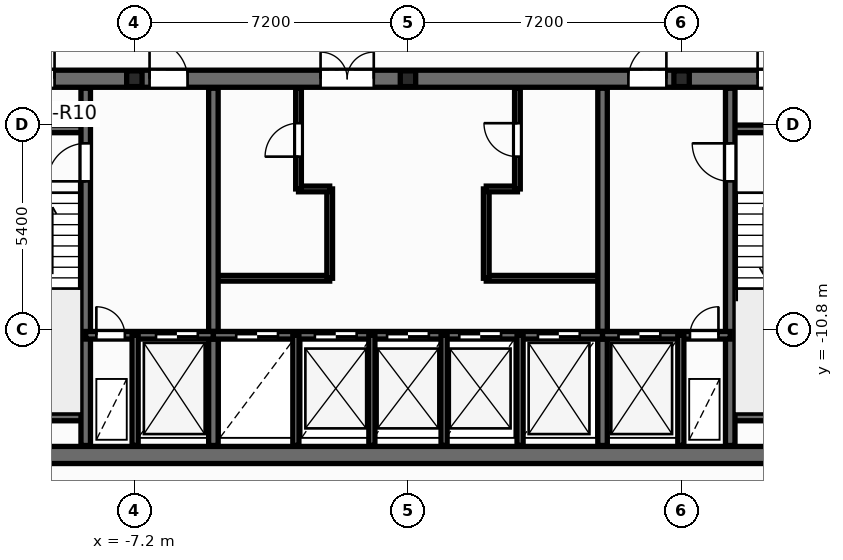
"""IFC4 building model, lengths in metres.
Left out: names, types, materials, properties, quantities, classifications, styles, units other than length and angle.
Written with IfcOpenShell. Run it as: python <this file> out.ifc"""

import sys

from ifc_helpers import new_model, si_unit, direction, frame, frame_2d, origin, origin_2d, place, context, subcontext, project, spatial, rectangle, i_section, extrude, element, fill, save


model = new_model("IFC4")
c1 = context("Model", 3, precision=1e-05, world=origin(), true_north=direction((0.0, 1.0)))
c2 = subcontext(c1, "Body", "Model", "MODEL_VIEW")
j1 = project(units=[si_unit("LENGTHUNIT", "METRE"), si_unit("PLANEANGLEUNIT", "RADIAN")], contexts=[c1])
p1 = place(None, origin())
s1 = spatial("IfcSite", under=j1, at=p1, CompositionType="ELEMENT")
p2 = place(p1, origin())
s2 = spatial("IfcBuilding", under=s1, at=p2, CompositionType="ELEMENT")
p3 = place(p2, frame((0.0, 0.0, 182.1)))
s3 = spatial("IfcBuildingStorey", under=s2, at=p3, CompositionType="ELEMENT", Elevation=182.1)
for number, where, z_axis, x_axis in (
    (1, (-7.2, -4.2, 0.0), (0.0, 0.0, 1.0), (1.0, 0.0, 0.0)),
    (2, (0.0, -4.2, 0.0), (0.0, 0.0, 1.0), (1.0, 0.0, 0.0)),
    (3, (7.2, -4.2, 0.0), (0.0, 0.0, 1.0), (1.0, 0.0, 0.0)),
):
    element("IfcColumn", number, at=place(p3, frame(where, z_axis=z_axis, x_axis=x_axis)), inside=s3, PredefinedType="PILASTER", context=c2, shape_type="SweptSolid", body=[
        extrude(i_section(OverallWidth=0.405, OverallDepth=0.414, WebThickness=0.022, FlangeThickness=0.032, at=origin_2d()), origin(), (0.0, 0.0, 1.0), 3.6),
    ])
p4 = place(p3, frame((-5.12, -9.45, 0.0), z_axis=(0.0, 0.0, 1.0), x_axis=(1.0, 0.0, 0.0)))
e4 = element("IfcWall", 4, at=p4, inside=s3, PredefinedType="PARTITIONING", context=c2, shape_type="SweptSolid", body=[
    extrude(rectangle(XDim=3.06, YDim=0.15, at=frame_2d((1.53, 0.0))), origin(), (0.0, 0.0, 1.0), 3.35),
])
p5 = place(p3, frame((-2.06, -9.45, 0.0), z_axis=(0.0, 0.0, 1.0), x_axis=(0.0, 1.0, 0.0)))
e5 = element("IfcWall", 5, at=p5, inside=s3, PredefinedType="PARTITIONING", context=c2, shape_type="SweptSolid", body=[
    extrude(rectangle(XDim=2.35, YDim=0.15, at=frame_2d((1.175, 0.0))), origin(), (0.0, 0.0, 1.0), 3.35),
])
p6 = place(p3, frame((-2.88, -7.1, 0.0), z_axis=(0.0, 0.0, 1.0), x_axis=(1.0, 0.0, 0.0)))
e6 = element("IfcWall", 6, at=p6, inside=s3, PredefinedType="PARTITIONING", context=c2, shape_type="SweptSolid", body=[
    extrude(rectangle(XDim=0.82, YDim=0.15, at=frame_2d((0.41, 0.0))), origin(), (0.0, 0.0, 1.0), 3.35),
])
p7 = place(p3, frame((-2.88, -7.1, 0.0), z_axis=(0.0, 0.0, 1.0), x_axis=(0.0, 1.0, 0.0)))
e7 = element("IfcWall", 7, at=p7, inside=s3, PredefinedType="PARTITIONING", context=c2, shape_type="SweptSolid", body=[
    extrude(rectangle(XDim=2.65, YDim=0.15, at=frame_2d((1.325, 0.0))), origin(), (0.0, 0.0, 1.0), 3.35),
])
p8 = place(p7, frame((0.85, 0.0, 0.0)))
e8 = element("IfcOpeningElement", 8, at=p8, cuts=e7, PredefinedType="OPENING", context=c2, shape_type="SweptSolid", body=[
    extrude(rectangle(XDim=0.886, YDim=2.104, at=frame_2d((0.44, 1.052))), frame((0.0, 0.085, 0.0), z_axis=(0.0, -1.0, 0.0), x_axis=(1.0, 0.0, 0.0)), (0.0, 0.0, 1.0), 0.17),
])
p9 = place(p3, frame((2.06, -9.45, 0.0), z_axis=(0.0, 0.0, 1.0), x_axis=(1.0, 0.0, 0.0)))
e9 = element("IfcWall", 9, at=p9, inside=s3, PredefinedType="PARTITIONING", context=c2, shape_type="SweptSolid", body=[
    extrude(rectangle(XDim=3.06, YDim=0.15, at=frame_2d((1.53, 0.0))), origin(), (0.0, 0.0, 1.0), 3.35),
])
p10 = place(p3, frame((2.06, -9.45, 0.0), z_axis=(0.0, 0.0, 1.0), x_axis=(0.0, 1.0, 0.0)))
e10 = element("IfcWall", 10, at=p10, inside=s3, PredefinedType="PARTITIONING", context=c2, shape_type="SweptSolid", body=[
    extrude(rectangle(XDim=2.35, YDim=0.15, at=frame_2d((1.175, 0.0))), origin(), (0.0, 0.0, 1.0), 3.35),
])
p11 = place(p3, frame((2.06, -7.1, 0.0), z_axis=(0.0, 0.0, 1.0), x_axis=(1.0, 0.0, 0.0)))
e11 = element("IfcWall", 11, at=p11, inside=s3, PredefinedType="PARTITIONING", context=c2, shape_type="SweptSolid", body=[
    extrude(rectangle(XDim=0.82, YDim=0.15, at=frame_2d((0.41, 0.0))), origin(), (0.0, 0.0, 1.0), 3.35),
])
p12 = place(p3, frame((2.88, -7.1, 0.0), z_axis=(0.0, 0.0, 1.0), x_axis=(0.0, 1.0, 0.0)))
e12 = element("IfcWall", 12, at=p12, inside=s3, PredefinedType="PARTITIONING", context=c2, shape_type="SweptSolid", body=[
    extrude(rectangle(XDim=2.65, YDim=0.15, at=frame_2d((1.325, 0.0))), origin(), (0.0, 0.0, 1.0), 3.35),
])
p13 = place(p12, frame((0.85, 0.0, 0.0)))
e13 = element("IfcOpeningElement", 13, at=p13, cuts=e12, PredefinedType="OPENING", context=c2, shape_type="SweptSolid", body=[
    extrude(rectangle(XDim=0.886, YDim=2.104, at=frame_2d((0.44, 1.052))), frame((0.0, 0.085, 0.0), z_axis=(0.0, -1.0, 0.0), x_axis=(1.0, 0.0, 0.0)), (0.0, 0.0, 1.0), 0.17),
])
p14 = place(p3, frame((-12.65, -14.1, 0.0), z_axis=(0.0, 0.0, 1.0), x_axis=(1.0, 0.0, 0.0)))
e14 = element("IfcWall", 14, at=p14, inside=s3, PredefinedType="SHEAR", context=c2, shape_type="SweptSolid", body=[
    extrude(rectangle(XDim=25.3, YDim=0.45, at=frame_2d((12.65, 0.0))), origin(), (0.0, 0.0, 1.0), 3.6),
])
p15 = place(p3, frame((-12.65, -4.2, 0.0), z_axis=(0.0, 0.0, 1.0), x_axis=(1.0, 0.0, 0.0)))
e15 = element("IfcWall", 15, at=p15, inside=s3, PredefinedType="SHEAR", context=c2, shape_type="SweptSolid", body=[
    extrude(rectangle(XDim=25.3, YDim=0.45, at=frame_2d((12.65, 0.0))), origin(), (0.0, 0.0, 1.0), 3.6),
])
p16 = place(p15, frame((0.95, 0.0, 0.0)))
e16 = element("IfcOpeningElement", 16, at=p16, cuts=e15, PredefinedType="OPENING", context=c2, shape_type="SweptSolid", body=[
    extrude(rectangle(XDim=0.756, YDim=2.054, at=frame_2d((0.375, 1.027))), frame((0.0, 0.235, 0.0), z_axis=(0.0, -1.0, 0.0), x_axis=(1.0, 0.0, 0.0)), (0.0, 0.0, 1.0), 0.47),
])
p17 = place(p15, frame((2.6, 0.0, 0.0)))
e17 = element("IfcOpeningElement", 17, at=p17, cuts=e15, PredefinedType="OPENING", context=c2, shape_type="SweptSolid", body=[
    extrude(rectangle(XDim=0.756, YDim=2.054, at=frame_2d((0.375, 1.027))), frame((0.0, 0.235, 0.0), z_axis=(0.0, -1.0, 0.0), x_axis=(1.0, 0.0, 0.0)), (0.0, 0.0, 1.0), 0.47),
])
p18 = place(p15, frame((21.85, 0.0, 0.0)))
e18 = element("IfcOpeningElement", 18, at=p18, cuts=e15, PredefinedType="OPENING", context=c2, shape_type="SweptSolid", body=[
    extrude(rectangle(XDim=0.756, YDim=2.054, at=frame_2d((0.375, 1.027))), frame((0.0, 0.235, 0.0), z_axis=(0.0, -1.0, 0.0), x_axis=(1.0, 0.0, 0.0)), (0.0, 0.0, 1.0), 0.47),
])
p19 = place(p15, frame((23.5, 0.0, 0.0)))
e19 = element("IfcOpeningElement", 19, at=p19, cuts=e15, PredefinedType="OPENING", context=c2, shape_type="SweptSolid", body=[
    extrude(rectangle(XDim=0.756, YDim=2.054, at=frame_2d((0.375, 1.027))), frame((0.0, 0.235, 0.0), z_axis=(0.0, -1.0, 0.0), x_axis=(1.0, 0.0, 0.0)), (0.0, 0.0, 1.0), 0.47),
])
p20 = place(p15, frame((5.85, 0.0, 0.0)))
e20 = element("IfcOpeningElement", 20, at=p20, cuts=e15, PredefinedType="OPENING", context=c2, shape_type="SweptSolid", body=[
    extrude(rectangle(XDim=1.006, YDim=2.104, at=frame_2d((0.5, 1.052))), frame((0.0, 0.235, 0.0), z_axis=(0.0, -1.0, 0.0), x_axis=(1.0, 0.0, 0.0)), (0.0, 0.0, 1.0), 0.47),
])
p21 = place(p15, frame((10.35, 0.0, 0.0)))
e21 = element("IfcOpeningElement", 21, at=p21, cuts=e15, PredefinedType="OPENING", context=c2, shape_type="SweptSolid", body=[
    extrude(rectangle(XDim=1.406, YDim=2.154, at=frame_2d((0.7, 1.077))), frame((0.0, 0.235, 0.0), z_axis=(0.0, -1.0, 0.0), x_axis=(1.0, 0.0, 0.0)), (0.0, 0.0, 1.0), 0.47),
])
p22 = place(p15, frame((18.45, 0.0, 0.0)))
e22 = element("IfcOpeningElement", 22, at=p22, cuts=e15, PredefinedType="OPENING", context=c2, shape_type="SweptSolid", body=[
    extrude(rectangle(XDim=1.006, YDim=2.104, at=frame_2d((0.5, 1.052))), frame((0.0, 0.235, 0.0), z_axis=(0.0, -1.0, 0.0), x_axis=(1.0, 0.0, 0.0)), (0.0, 0.0, 1.0), 0.47),
])
for number, where, z_axis, x_axis in (
    (23, (-12.35, -5.52, 0.0), (0.0, 0.0, 1.0), (1.0, 0.0, 0.0)),
    (24, (-12.35, -13.1, 0.0), (0.0, 0.0, 1.0), (1.0, 0.0, 0.0)),
    (25, (8.48, -5.52, 0.0), (0.0, 0.0, 1.0), (1.0, 0.0, 0.0)),
    (26, (8.48, -13.1, 0.0), (0.0, 0.0, 1.0), (1.0, 0.0, 0.0)),
):
    element("IfcWall", number, at=place(p3, frame(where, z_axis=z_axis, x_axis=x_axis)), inside=s3, PredefinedType="SOLIDWALL", context=c2, shape_type="SweptSolid", body=[
        extrude(rectangle(XDim=3.87, YDim=0.2, at=frame_2d((1.935, 0.0))), origin(), (0.0, 0.0, 1.0), 3.6),
    ])
p23 = place(p3, frame((-8.48, -13.85, 0.0), z_axis=(0.0, 0.0, 1.0), x_axis=(0.0, 1.0, 0.0)))
e27 = element("IfcWall", 27, at=p23, inside=s3, PredefinedType="SHEAR", context=c2, shape_type="SweptSolid", body=[
    extrude(rectangle(XDim=9.4, YDim=0.25, at=frame_2d((4.7, 0.0))), origin(), (0.0, 0.0, 1.0), 3.6),
])
p24 = place(p23, frame((6.95, 0.0, 0.0)))
e28 = element("IfcOpeningElement", 28, at=p24, cuts=e27, PredefinedType="OPENING", context=c2, shape_type="SweptSolid", body=[
    extrude(rectangle(XDim=1.006, YDim=2.104, at=frame_2d((0.5, 1.052))), frame((0.0, 0.135, 0.0), z_axis=(0.0, -1.0, 0.0), x_axis=(1.0, 0.0, 0.0)), (0.0, 0.0, 1.0), 0.27),
])
p25 = place(p3, frame((8.48, -13.85, 0.0), z_axis=(0.0, 0.0, 1.0), x_axis=(0.0, 1.0, 0.0)))
e29 = element("IfcWall", 29, at=p25, inside=s3, PredefinedType="SHEAR", context=c2, shape_type="SweptSolid", body=[
    extrude(rectangle(XDim=9.4, YDim=0.25, at=frame_2d((4.7, 0.0))), origin(), (0.0, 0.0, 1.0), 3.6),
])
p26 = place(p25, frame((6.95, 0.0, 0.0)))
e30 = element("IfcOpeningElement", 30, at=p26, cuts=e29, PredefinedType="OPENING", context=c2, shape_type="SweptSolid", body=[
    extrude(rectangle(XDim=1.006, YDim=2.104, at=frame_2d((0.5, 1.052))), frame((0.0, 0.135, 0.0), z_axis=(0.0, -1.0, 0.0), x_axis=(1.0, 0.0, 0.0)), (0.0, 0.0, 1.0), 0.27),
])
for number, where, z_axis, x_axis in (
    (31, (-5.12, -13.85, 0.0), (0.0, 0.0, 1.0), (0.0, 1.0, 0.0)),
    (32, (5.12, -13.85, 0.0), (0.0, 0.0, 1.0), (0.0, 1.0, 0.0)),
):
    element("IfcWall", number, at=place(p3, frame(where, z_axis=z_axis, x_axis=x_axis)), inside=s3, PredefinedType="SHEAR", context=c2, shape_type="SweptSolid", body=[
        extrude(rectangle(XDim=9.4, YDim=0.25, at=frame_2d((4.7, 0.0))), origin(), (0.0, 0.0, 1.0), 3.6),
    ])
p27 = place(p3, frame((-8.48, -10.95, 0.0), z_axis=(0.0, 0.0, 1.0), x_axis=(1.0, 0.0, 0.0)))
e33 = element("IfcWall", 33, at=p27, inside=s3, PredefinedType="SOLIDWALL", context=c2, shape_type="SweptSolid", body=[
    extrude(rectangle(XDim=3.36, YDim=0.2, at=frame_2d((1.68, 0.0))), origin(), (0.0, 0.0, 1.0), 3.6),
])
p28 = place(p27, frame((0.28, 0.0, 0.0)))
e34 = element("IfcOpeningElement", 34, at=p28, cuts=e33, PredefinedType="OPENING", context=c2, shape_type="SweptSolid", body=[
    extrude(rectangle(XDim=0.756, YDim=2.054, at=frame_2d((0.375, 1.027))), frame((0.0, 0.11, 0.0), z_axis=(0.0, -1.0, 0.0), x_axis=(1.0, 0.0, 0.0)), (0.0, 0.0, 1.0), 0.22),
])
p29 = place(p27, frame((1.85, 0.0, 0.0)))
e35 = element("IfcOpeningElement", 35, at=p29, cuts=e33, PredefinedType="OPENING", context=c2, shape_type="SweptSolid", body=[
    extrude(rectangle(XDim=1.106, YDim=2.104, at=frame_2d((0.55, 1.052))), frame((0.0, 0.11, 0.0), z_axis=(0.0, -1.0, 0.0), x_axis=(1.0, 0.0, 0.0)), (0.0, 0.0, 1.0), 0.22),
])
p30 = place(p3, frame((-5.12, -10.95, 0.0), z_axis=(0.0, 0.0, 1.0), x_axis=(1.0, 0.0, 0.0)))
e36 = element("IfcWall", 36, at=p30, inside=s3, PredefinedType="SOLIDWALL", context=c2, shape_type="SweptSolid", body=[
    extrude(rectangle(XDim=10.24, YDim=0.2, at=frame_2d((5.12, 0.0))), origin(), (0.0, 0.0, 1.0), 3.6),
])
p31 = place(p30, frame((0.6, 0.0, 0.0)))
e37 = element("IfcOpeningElement", 37, at=p31, cuts=e36, PredefinedType="OPENING", context=c2, shape_type="SweptSolid", body=[
    extrude(rectangle(XDim=1.106, YDim=2.104, at=frame_2d((0.55, 1.052))), frame((0.0, 0.11, 0.0), z_axis=(0.0, -1.0, 0.0), x_axis=(1.0, 0.0, 0.0)), (0.0, 0.0, 1.0), 0.22),
])
p32 = place(p30, frame((2.67, 0.0, 0.0)))
e38 = element("IfcOpeningElement", 38, at=p32, cuts=e36, PredefinedType="OPENING", context=c2, shape_type="SweptSolid", body=[
    extrude(rectangle(XDim=1.106, YDim=2.104, at=frame_2d((0.55, 1.052))), frame((0.0, 0.11, 0.0), z_axis=(0.0, -1.0, 0.0), x_axis=(1.0, 0.0, 0.0)), (0.0, 0.0, 1.0), 0.22),
])
p33 = place(p30, frame((4.57, 0.0, 0.0)))
e39 = element("IfcOpeningElement", 39, at=p33, cuts=e36, PredefinedType="OPENING", context=c2, shape_type="SweptSolid", body=[
    extrude(rectangle(XDim=1.106, YDim=2.104, at=frame_2d((0.55, 1.052))), frame((0.0, 0.11, 0.0), z_axis=(0.0, -1.0, 0.0), x_axis=(1.0, 0.0, 0.0)), (0.0, 0.0, 1.0), 0.22),
])
p34 = place(p30, frame((6.47, 0.0, 0.0)))
e40 = element("IfcOpeningElement", 40, at=p34, cuts=e36, PredefinedType="OPENING", context=c2, shape_type="SweptSolid", body=[
    extrude(rectangle(XDim=1.106, YDim=2.104, at=frame_2d((0.55, 1.052))), frame((0.0, 0.11, 0.0), z_axis=(0.0, -1.0, 0.0), x_axis=(1.0, 0.0, 0.0)), (0.0, 0.0, 1.0), 0.22),
])
p35 = place(p30, frame((8.54, 0.0, 0.0)))
e41 = element("IfcOpeningElement", 41, at=p35, cuts=e36, PredefinedType="OPENING", context=c2, shape_type="SweptSolid", body=[
    extrude(rectangle(XDim=1.106, YDim=2.104, at=frame_2d((0.55, 1.052))), frame((0.0, 0.11, 0.0), z_axis=(0.0, -1.0, 0.0), x_axis=(1.0, 0.0, 0.0)), (0.0, 0.0, 1.0), 0.22),
])
p36 = place(p3, frame((5.12, -10.95, 0.0), z_axis=(0.0, 0.0, 1.0), x_axis=(1.0, 0.0, 0.0)))
e42 = element("IfcWall", 42, at=p36, inside=s3, PredefinedType="SOLIDWALL", context=c2, shape_type="SweptSolid", body=[
    extrude(rectangle(XDim=3.36, YDim=0.2, at=frame_2d((1.68, 0.0))), origin(), (0.0, 0.0, 1.0), 3.6),
])
p37 = place(p36, frame((0.42, 0.0, 0.0)))
e43 = element("IfcOpeningElement", 43, at=p37, cuts=e42, PredefinedType="OPENING", context=c2, shape_type="SweptSolid", body=[
    extrude(rectangle(XDim=1.106, YDim=2.104, at=frame_2d((0.55, 1.052))), frame((0.0, 0.11, 0.0), z_axis=(0.0, -1.0, 0.0), x_axis=(1.0, 0.0, 0.0)), (0.0, 0.0, 1.0), 0.22),
])
p38 = place(p36, frame((2.3, 0.0, 0.0)))
e44 = element("IfcOpeningElement", 44, at=p38, cuts=e42, PredefinedType="OPENING", context=c2, shape_type="SweptSolid", body=[
    extrude(rectangle(XDim=0.756, YDim=2.054, at=frame_2d((0.375, 1.027))), frame((0.0, 0.11, 0.0), z_axis=(0.0, -1.0, 0.0), x_axis=(1.0, 0.0, 0.0)), (0.0, 0.0, 1.0), 0.22),
])
for number, where, z_axis, x_axis in (
    (45, (-7.18, -13.85, 0.0), (0.0, 0.0, 1.0), (0.0, 1.0, 0.0)),
    (46, (7.18, -13.85, 0.0), (0.0, 0.0, 1.0), (0.0, 1.0, 0.0)),
    (47, (-2.95, -13.85, 0.0), (0.0, 0.0, 1.0), (0.0, 1.0, 0.0)),
    (48, (2.95, -13.85, 0.0), (0.0, 0.0, 1.0), (0.0, 1.0, 0.0)),
    (49, (-0.95, -13.85, 0.0), (0.0, 0.0, 1.0), (0.0, 1.0, 0.0)),
    (50, (0.95, -13.85, 0.0), (0.0, 0.0, 1.0), (0.0, 1.0, 0.0)),
):
    element("IfcWall", number, at=place(p3, frame(where, z_axis=z_axis, x_axis=x_axis)), inside=s3, PredefinedType="PARTITIONING", context=c2, shape_type="SweptSolid", body=[
        extrude(rectangle(XDim=2.9, YDim=0.16, at=frame_2d((1.45, 0.0))), origin(), (0.0, 0.0, 1.0), 2.475),
    ])
p39 = place(p8, origin())
e51 = element("IfcDoor", 51, at=p39, inside=s3, OperationType="SINGLE_SWING_LEFT", PredefinedType="DOOR", context=c2, shape_type="SweptSolid", body=[
    extrude(rectangle(XDim=0.88, YDim=2.1, at=frame_2d((0.44, 1.05))), frame((0.0, 0.025, 0.0), z_axis=(0.0, -1.0, 0.0), x_axis=(1.0, 0.0, 0.0)), (0.0, 0.0, 1.0), 0.05),
])
fill(e8, e51)
p40 = place(p13, origin())
e52 = element("IfcDoor", 52, at=p40, inside=s3, OperationType="SINGLE_SWING_RIGHT", PredefinedType="DOOR", context=c2, shape_type="SweptSolid", body=[
    extrude(rectangle(XDim=0.88, YDim=2.1, at=frame_2d((0.44, 1.05))), frame((0.0, 0.025, 0.0), z_axis=(0.0, -1.0, 0.0), x_axis=(1.0, 0.0, 0.0)), (0.0, 0.0, 1.0), 0.05),
])
fill(e13, e52)
p41 = place(p24, origin())
e53 = element("IfcDoor", 53, at=p41, inside=s3, OperationType="SINGLE_SWING_LEFT", PredefinedType="DOOR", context=c2, shape_type="SweptSolid", body=[
    extrude(rectangle(XDim=1.0, YDim=2.1, at=frame_2d((0.5, 1.05))), frame((0.0, 0.025, 0.0), z_axis=(0.0, -1.0, 0.0), x_axis=(1.0, 0.0, 0.0)), (0.0, 0.0, 1.0), 0.05),
])
fill(e28, e53)
p42 = place(p26, origin())
e54 = element("IfcDoor", 54, at=p42, inside=s3, OperationType="SINGLE_SWING_RIGHT", PredefinedType="DOOR", context=c2, shape_type="SweptSolid", body=[
    extrude(rectangle(XDim=1.0, YDim=2.1, at=frame_2d((0.5, 1.05))), frame((0.0, 0.025, 0.0), z_axis=(0.0, -1.0, 0.0), x_axis=(1.0, 0.0, 0.0)), (0.0, 0.0, 1.0), 0.05),
])
fill(e30, e54)
p43 = place(p28, origin())
e55 = element("IfcDoor", 55, at=p43, inside=s3, OperationType="SINGLE_SWING_LEFT", PredefinedType="DOOR", context=c2, shape_type="SweptSolid", body=[
    extrude(rectangle(XDim=0.75, YDim=2.05, at=frame_2d((0.375, 1.025))), frame((0.0, 0.025, 0.0), z_axis=(0.0, -1.0, 0.0), x_axis=(1.0, 0.0, 0.0)), (0.0, 0.0, 1.0), 0.05),
])
fill(e34, e55)
p44 = place(p29, origin())
e56 = element("IfcDoor", 56, at=p44, inside=s3, OperationType="DOUBLE_DOOR_SLIDING", PredefinedType="DOOR", context=c2, shape_type="SweptSolid", body=[
    extrude(rectangle(XDim=1.1, YDim=2.1, at=frame_2d((0.55, 1.05))), frame((0.0, 0.025, 0.0), z_axis=(0.0, -1.0, 0.0), x_axis=(1.0, 0.0, 0.0)), (0.0, 0.0, 1.0), 0.05),
])
fill(e35, e56)
p45 = place(p37, origin())
e57 = element("IfcDoor", 57, at=p45, inside=s3, OperationType="DOUBLE_DOOR_SLIDING", PredefinedType="DOOR", context=c2, shape_type="SweptSolid", body=[
    extrude(rectangle(XDim=1.1, YDim=2.1, at=frame_2d((0.55, 1.05))), frame((0.0, 0.025, 0.0), z_axis=(0.0, -1.0, 0.0), x_axis=(1.0, 0.0, 0.0)), (0.0, 0.0, 1.0), 0.05),
])
fill(e43, e57)
p46 = place(p38, origin())
e58 = element("IfcDoor", 58, at=p46, inside=s3, OperationType="SINGLE_SWING_RIGHT", PredefinedType="DOOR", context=c2, shape_type="SweptSolid", body=[
    extrude(rectangle(XDim=0.75, YDim=2.05, at=frame_2d((0.375, 1.025))), frame((0.0, 0.025, 0.0), z_axis=(0.0, -1.0, 0.0), x_axis=(1.0, 0.0, 0.0)), (0.0, 0.0, 1.0), 0.05),
])
fill(e44, e58)
p47 = place(p31, origin())
e59 = element("IfcDoor", 59, at=p47, inside=s3, OperationType="DOUBLE_DOOR_SLIDING", PredefinedType="DOOR", context=c2, shape_type="SweptSolid", body=[
    extrude(rectangle(XDim=1.1, YDim=2.1, at=frame_2d((0.55, 1.05))), frame((0.0, 0.025, 0.0), z_axis=(0.0, -1.0, 0.0), x_axis=(1.0, 0.0, 0.0)), (0.0, 0.0, 1.0), 0.05),
])
fill(e37, e59)
p48 = place(p32, origin())
e60 = element("IfcDoor", 60, at=p48, inside=s3, OperationType="DOUBLE_DOOR_SLIDING", PredefinedType="DOOR", context=c2, shape_type="SweptSolid", body=[
    extrude(rectangle(XDim=1.1, YDim=2.1, at=frame_2d((0.55, 1.05))), frame((0.0, 0.025, 0.0), z_axis=(0.0, -1.0, 0.0), x_axis=(1.0, 0.0, 0.0)), (0.0, 0.0, 1.0), 0.05),
])
fill(e38, e60)
p49 = place(p33, origin())
e61 = element("IfcDoor", 61, at=p49, inside=s3, OperationType="DOUBLE_DOOR_SLIDING", PredefinedType="DOOR", context=c2, shape_type="SweptSolid", body=[
    extrude(rectangle(XDim=1.1, YDim=2.1, at=frame_2d((0.55, 1.05))), frame((0.0, 0.025, 0.0), z_axis=(0.0, -1.0, 0.0), x_axis=(1.0, 0.0, 0.0)), (0.0, 0.0, 1.0), 0.05),
])
fill(e39, e61)
p50 = place(p34, origin())
e62 = element("IfcDoor", 62, at=p50, inside=s3, OperationType="DOUBLE_DOOR_SLIDING", PredefinedType="DOOR", context=c2, shape_type="SweptSolid", body=[
    extrude(rectangle(XDim=1.1, YDim=2.1, at=frame_2d((0.55, 1.05))), frame((0.0, 0.025, 0.0), z_axis=(0.0, -1.0, 0.0), x_axis=(1.0, 0.0, 0.0)), (0.0, 0.0, 1.0), 0.05),
])
fill(e40, e62)
p51 = place(p35, origin())
e63 = element("IfcDoor", 63, at=p51, inside=s3, OperationType="DOUBLE_DOOR_SLIDING", PredefinedType="DOOR", context=c2, shape_type="SweptSolid", body=[
    extrude(rectangle(XDim=1.1, YDim=2.1, at=frame_2d((0.55, 1.05))), frame((0.0, 0.025, 0.0), z_axis=(0.0, -1.0, 0.0), x_axis=(1.0, 0.0, 0.0)), (0.0, 0.0, 1.0), 0.05),
])
fill(e41, e63)
p52 = place(p17, origin())
e64 = element("IfcDoor", 64, at=p52, inside=s3, OperationType="SINGLE_SWING_RIGHT", PredefinedType="DOOR", context=c2, shape_type="SweptSolid", body=[
    extrude(rectangle(XDim=0.75, YDim=2.05, at=frame_2d((0.375, 1.025))), frame((0.0, 0.025, 0.0), z_axis=(0.0, -1.0, 0.0), x_axis=(1.0, 0.0, 0.0)), (0.0, 0.0, 1.0), 0.05),
])
fill(e17, e64)
p53 = place(p18, origin())
e65 = element("IfcDoor", 65, at=p53, inside=s3, OperationType="SINGLE_SWING_LEFT", PredefinedType="DOOR", context=c2, shape_type="SweptSolid", body=[
    extrude(rectangle(XDim=0.75, YDim=2.05, at=frame_2d((0.375, 1.025))), frame((0.0, 0.025, 0.0), z_axis=(0.0, -1.0, 0.0), x_axis=(1.0, 0.0, 0.0)), (0.0, 0.0, 1.0), 0.05),
])
fill(e18, e65)
p54 = place(p20, origin())
e66 = element("IfcDoor", 66, at=p54, inside=s3, OperationType="SINGLE_SWING_LEFT", PredefinedType="DOOR", context=c2, shape_type="SweptSolid", body=[
    extrude(rectangle(XDim=1.0, YDim=2.1, at=frame_2d((0.5, 1.05))), frame((0.0, 0.025, 0.0), z_axis=(0.0, -1.0, 0.0), x_axis=(1.0, 0.0, 0.0)), (0.0, 0.0, 1.0), 0.05),
])
fill(e20, e66)
p55 = place(p21, origin())
e67 = element("IfcDoor", 67, at=p55, inside=s3, OperationType="DOUBLE_DOOR_SINGLE_SWING", PredefinedType="DOOR", context=c2, shape_type="SweptSolid", body=[
    extrude(rectangle(XDim=1.4, YDim=2.15, at=frame_2d((0.7, 1.075))), frame((0.0, 0.025, 0.0), z_axis=(0.0, -1.0, 0.0), x_axis=(1.0, 0.0, 0.0)), (0.0, 0.0, 1.0), 0.05),
])
fill(e21, e67)
p56 = place(p22, origin())
e68 = element("IfcDoor", 68, at=p56, inside=s3, OperationType="SINGLE_SWING_RIGHT", PredefinedType="DOOR", context=c2, shape_type="SweptSolid", body=[
    extrude(rectangle(XDim=1.0, YDim=2.1, at=frame_2d((0.5, 1.05))), frame((0.0, 0.025, 0.0), z_axis=(0.0, -1.0, 0.0), x_axis=(1.0, 0.0, 0.0)), (0.0, 0.0, 1.0), 0.05),
])
fill(e22, e68)
save(model, sys.argv[1])
